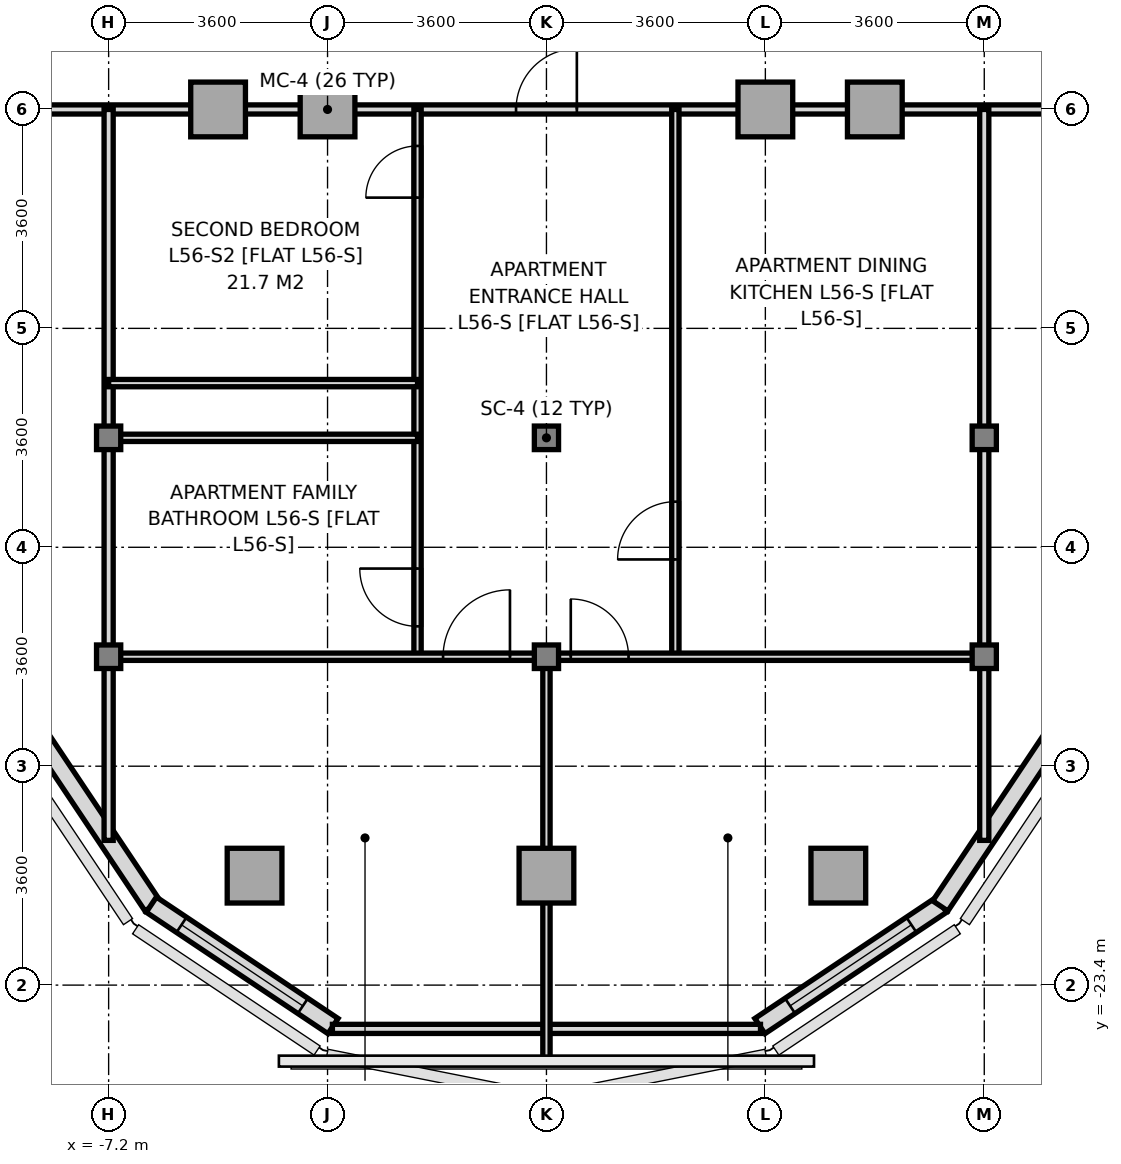
"""IFC4 building model, lengths in metres.
Left out: names, types, materials, properties, quantities, classifications, styles, units other than length and angle.
Written with IfcOpenShell. Run it as: python <this file> out.ifc"""

import sys

from ifc_helpers import new_model, si_unit, direction, frame, frame_2d, origin, origin_2d, place, context, subcontext, project, spatial, rectangle, i_section, extrude, source, transform, mapped, element, fill, save


model = new_model("IFC4")
c1 = context("Model", 3, precision=1e-05, world=origin(), true_north=direction((0.0, 1.0)))
c2 = subcontext(c1, "Body", "Model", "MODEL_VIEW")
j1 = project(units=[si_unit("LENGTHUNIT", "METRE"), si_unit("PLANEANGLEUNIT", "RADIAN")], contexts=[c1])
p1 = place(None, origin())
s1 = spatial("IfcSite", under=j1, at=p1, CompositionType="ELEMENT")
p2 = place(p1, origin())
s2 = spatial("IfcBuilding", under=s1, at=p2, CompositionType="ELEMENT")
p3 = place(p2, frame((0.0, 0.0, 204.6)))
s3 = spatial("IfcBuildingStorey", under=s2, at=p3, CompositionType="ELEMENT", Elevation=204.6)
m1 = source(origin(), c2, "Body", "SweptSolid", [
    extrude(i_section(OverallWidth=0.398, OverallDepth=0.387, WebThickness=0.018, FlangeThickness=0.028, at=origin_2d()), origin(), (0.0, 0.0, 1.0), 3.2),
])
for number, where, z_axis, x_axis in (
    (1, (-7.2, -18.0, 0.0), (0.0, 0.0, 1.0), (1.0, 0.0, 0.0)),
    (2, (-7.2, -14.4, 0.0), (0.0, 0.0, 1.0), (1.0, 0.0, 0.0)),
):
    element("IfcColumn", number, at=place(p3, frame(where, z_axis=z_axis, x_axis=x_axis)), inside=s3, PredefinedType="COLUMN", context=c2, shape_type="MappedRepresentation", body=[
        mapped(m1, transform((0.0, 0.0, 0.0), x_axis=(1.0, 0.0, 0.0), y_axis=(0.0, 1.0, 0.0), z_axis=(0.0, 0.0, 1.0), scale=1.0)),
    ])
m2 = source(origin(), c2, "Body", "SweptSolid", [
    extrude(rectangle(XDim=0.9, YDim=0.9, at=origin_2d()), origin(), (0.0, 0.0, 1.0), 3.2),
])
for number, where, z_axis, x_axis in (
    (3, (-5.4, -9.0, 0.0), (0.0, 0.0, 1.0), (1.0, 0.0, 0.0)),
    (4, (-4.8, -21.6, 0.0), (0.0, 0.0, 1.0), (1.0, 0.0, 0.0)),
    (5, (-3.6, -9.0, 0.0), (0.0, 0.0, 1.0), (1.0, 0.0, 0.0)),
    (6, (0.0, -21.6, 0.0), (0.0, 0.0, 1.0), (1.0, 0.0, 0.0)),
):
    element("IfcColumn", number, at=place(p3, frame(where, z_axis=z_axis, x_axis=x_axis)), inside=s3, PredefinedType="COLUMN", context=c2, shape_type="MappedRepresentation", body=[
        mapped(m2, transform((0.0, 0.0, 0.0), x_axis=(1.0, 0.0, 0.0), y_axis=(0.0, 1.0, 0.0), z_axis=(0.0, 0.0, 1.0), scale=1.0)),
    ])
for number, where, z_axis, x_axis in (
    (7, (0.0, -18.0, 0.0), (0.0, 0.0, 1.0), (1.0, 0.0, 0.0)),
    (8, (0.0, -14.4, 0.0), (0.0, 0.0, 1.0), (1.0, 0.0, 0.0)),
):
    element("IfcColumn", number, at=place(p3, frame(where, z_axis=z_axis, x_axis=x_axis)), inside=s3, PredefinedType="COLUMN", context=c2, shape_type="MappedRepresentation", body=[
        mapped(m1, transform((0.0, 0.0, 0.0), x_axis=(1.0, 0.0, 0.0), y_axis=(0.0, 1.0, 0.0), z_axis=(0.0, 0.0, 1.0), scale=1.0)),
    ])
for number, where, z_axis, x_axis in (
    (9, (3.6, -9.0, 0.0), (0.0, 0.0, 1.0), (1.0, 0.0, 0.0)),
    (10, (4.8, -21.6, 0.0), (0.0, 0.0, 1.0), (1.0, 0.0, 0.0)),
    (11, (5.4, -9.0, 0.0), (0.0, 0.0, 1.0), (1.0, 0.0, 0.0)),
):
    element("IfcColumn", number, at=place(p3, frame(where, z_axis=z_axis, x_axis=x_axis)), inside=s3, PredefinedType="COLUMN", context=c2, shape_type="MappedRepresentation", body=[
        mapped(m2, transform((0.0, 0.0, 0.0), x_axis=(1.0, 0.0, 0.0), y_axis=(0.0, 1.0, 0.0), z_axis=(0.0, 0.0, 1.0), scale=1.0)),
    ])
for number, where, z_axis, x_axis in (
    (12, (7.2, -18.0, 0.0), (0.0, 0.0, 1.0), (1.0, 0.0, 0.0)),
    (13, (7.2, -14.4, 0.0), (0.0, 0.0, 1.0), (1.0, 0.0, 0.0)),
):
    element("IfcColumn", number, at=place(p3, frame(where, z_axis=z_axis, x_axis=x_axis)), inside=s3, PredefinedType="COLUMN", context=c2, shape_type="MappedRepresentation", body=[
        mapped(m1, transform((0.0, 0.0, 0.0), x_axis=(1.0, 0.0, 0.0), y_axis=(0.0, 1.0, 0.0), z_axis=(0.0, 0.0, 1.0), scale=1.0)),
    ])
p4 = place(p3, frame((-8.482, -19.097, 0.0), z_axis=(0.0, 0.0, 1.0), x_axis=(0.555574187116, -0.831466970246, 0.0)))
e14 = element("IfcWall", 14, at=p4, inside=s3, PredefinedType="SOLIDWALL", context=c2, shape_type="SweptSolid", body=[
    extrude(rectangle(XDim=3.609, YDim=0.3, at=frame_2d((1.804, 0.0))), origin(), (0.0, 0.0, 1.0), 3.2),
])
p5 = place(p3, frame((-6.498, -22.077, 0.0), z_axis=(0.0, 0.0, 1.0), x_axis=(0.8314749531, -0.555562239868, 0.0)))
e15 = element("IfcWall", 15, at=p5, inside=s3, PredefinedType="SOLIDWALL", context=c2, shape_type="SweptSolid", body=[
    extrude(rectangle(XDim=3.593, YDim=0.3, at=frame_2d((1.797, 0.0))), origin(), (0.0, 0.0, 1.0), 3.2),
])
p6 = place(p5, frame((0.597, 0.0, 0.8)))
e16 = element("IfcOpeningElement", 16, at=p6, cuts=e15, PredefinedType="OPENING", context=c2, shape_type="SweptSolid", body=[
    extrude(rectangle(XDim=2.4, YDim=2.2, at=frame_2d((1.2, 1.1))), frame((0.0, 0.16, 0.0), z_axis=(0.0, -1.0, 0.0), x_axis=(1.0, 0.0, 0.0)), (0.0, 0.0, 1.0), 0.32),
])
p7 = place(p3, frame((3.51, -24.073, 0.0), z_axis=(0.0, 0.0, 1.0), x_axis=(0.8314749531, 0.555562239868, 0.0)))
e17 = element("IfcWall", 17, at=p7, inside=s3, PredefinedType="SOLIDWALL", context=c2, shape_type="SweptSolid", body=[
    extrude(rectangle(XDim=3.593, YDim=0.3, at=frame_2d((1.797, 0.0))), origin(), (0.0, 0.0, 1.0), 3.2),
])
p8 = place(p7, frame((0.597, 0.0, 0.8)))
e18 = element("IfcOpeningElement", 18, at=p8, cuts=e17, PredefinedType="OPENING", context=c2, shape_type="SweptSolid", body=[
    extrude(rectangle(XDim=2.4, YDim=2.2, at=frame_2d((1.2, 1.1))), frame((0.0, 0.16, 0.0), z_axis=(0.0, -1.0, 0.0), x_axis=(1.0, 0.0, 0.0)), (0.0, 0.0, 1.0), 0.32),
])
p9 = place(p3, frame((6.477, -22.098, 0.0), z_axis=(0.0, 0.0, 1.0), x_axis=(0.555574187116, 0.831466970246, 0.0)))
e19 = element("IfcWall", 19, at=p9, inside=s3, PredefinedType="SOLIDWALL", context=c2, shape_type="SweptSolid", body=[
    extrude(rectangle(XDim=3.609, YDim=0.3, at=frame_2d((1.804, 0.0))), origin(), (0.0, 0.0, 1.0), 3.2),
])
p10 = place(p3, frame((-9.55, -9.0, 0.0), z_axis=(0.0, 0.0, 1.0), x_axis=(1.0, 0.0, 0.0)))
e20 = element("IfcWall", 20, at=p10, inside=s3, PredefinedType="PARTITIONING", context=c2, shape_type="SweptSolid", body=[
    extrude(rectangle(XDim=19.1, YDim=0.15, at=frame_2d((9.55, 0.0))), origin(), (0.0, 0.0, 1.0), 2.75),
])
p11 = place(p10, frame((9.05, 0.0, 0.0)))
e21 = element("IfcOpeningElement", 21, at=p11, cuts=e20, PredefinedType="OPENING", context=c2, shape_type="SweptSolid", body=[
    extrude(rectangle(XDim=1.0, YDim=2.2, at=frame_2d((0.5, 1.1))), frame((0.0, 0.085, 0.0), z_axis=(0.0, -1.0, 0.0), x_axis=(1.0, 0.0, 0.0)), (0.0, 0.0, 1.0), 0.17),
])
for number, where, z_axis, x_axis in (
    (22, (-7.2, -21.02, 0.0), (0.0, 0.0, 1.0), (0.0, 1.0, 0.0)),
    (23, (7.2, -21.02, 0.0), (0.0, 0.0, 1.0), (0.0, 1.0, 0.0)),
):
    element("IfcWall", number, at=place(p3, frame(where, z_axis=z_axis, x_axis=x_axis)), inside=s3, PredefinedType="PARTITIONING", context=c2, shape_type="SweptSolid", body=[
        extrude(rectangle(XDim=12.02, YDim=0.15, at=frame_2d((6.01, 0.0))), origin(), (0.0, 0.0, 1.0), 2.75),
    ])
p12 = place(p3, frame((-3.52, -24.12, 0.0), z_axis=(0.0, 0.0, 1.0), x_axis=(1.0, 0.0, 0.0)))
e24 = element("IfcWall", 24, at=p12, inside=s3, PredefinedType="PARTITIONING", context=c2, shape_type="SweptSolid", body=[
    extrude(rectangle(XDim=7.04, YDim=0.15, at=frame_2d((3.52, 0.0))), origin(), (0.0, 0.0, 1.0), 3.2),
])
p13 = place(p3, frame((-2.12, -18.0, 0.0), z_axis=(0.0, 0.0, 1.0), x_axis=(0.0, 1.0, 0.0)))
e25 = element("IfcWall", 25, at=p13, inside=s3, PredefinedType="PARTITIONING", context=c2, shape_type="SweptSolid", body=[
    extrude(rectangle(XDim=9.0, YDim=0.12, at=frame_2d((4.5, 0.0))), origin(), (0.0, 0.0, 1.0), 2.75),
])
p14 = place(p13, frame((7.55, 0.0, 0.0)))
e26 = element("IfcOpeningElement", 26, at=p14, cuts=e25, PredefinedType="OPENING", context=c2, shape_type="SweptSolid", body=[
    extrude(rectangle(XDim=0.85, YDim=2.1, at=frame_2d((0.425, 1.05))), frame((0.0, 0.07, 0.0), z_axis=(0.0, -1.0, 0.0), x_axis=(1.0, 0.0, 0.0)), (0.0, 0.0, 1.0), 0.14),
])
p15 = place(p13, frame((0.5, 0.0, 0.0)))
e27 = element("IfcOpeningElement", 27, at=p15, cuts=e25, PredefinedType="OPENING", context=c2, shape_type="SweptSolid", body=[
    extrude(rectangle(XDim=0.95, YDim=2.15, at=frame_2d((0.475, 1.075))), frame((0.0, 0.07, 0.0), z_axis=(0.0, -1.0, 0.0), x_axis=(1.0, 0.0, 0.0)), (0.0, 0.0, 1.0), 0.14),
])
p16 = place(p3, frame((-7.2, -13.5, 0.0), z_axis=(0.0, 0.0, 1.0), x_axis=(1.0, 0.0, 0.0)))
e28 = element("IfcWall", 28, at=p16, inside=s3, PredefinedType="PARTITIONING", context=c2, shape_type="SweptSolid", body=[
    extrude(rectangle(XDim=5.08, YDim=0.12, at=frame_2d((2.54, 0.0))), origin(), (0.0, 0.0, 1.0), 3.2),
])
p17 = place(p3, frame((2.12, -18.0, 0.0), z_axis=(0.0, 0.0, 1.0), x_axis=(0.0, 1.0, 0.0)))
e29 = element("IfcWall", 29, at=p17, inside=s3, PredefinedType="PARTITIONING", context=c2, shape_type="SweptSolid", body=[
    extrude(rectangle(XDim=9.0, YDim=0.12, at=frame_2d((4.5, 0.0))), origin(), (0.0, 0.0, 1.0), 2.75),
])
p18 = place(p17, frame((1.6, 0.0, 0.0)))
e30 = element("IfcOpeningElement", 30, at=p18, cuts=e29, PredefinedType="OPENING", context=c2, shape_type="SweptSolid", body=[
    extrude(rectangle(XDim=0.95, YDim=2.15, at=frame_2d((0.475, 1.075))), frame((0.0, 0.07, 0.0), z_axis=(0.0, -1.0, 0.0), x_axis=(1.0, 0.0, 0.0)), (0.0, 0.0, 1.0), 0.14),
])
p19 = place(p3, frame((-7.2, -18.0, 0.0), z_axis=(0.0, 0.0, 1.0), x_axis=(1.0, 0.0, 0.0)))
e31 = element("IfcWall", 31, at=p19, inside=s3, PredefinedType="PARTITIONING", context=c2, shape_type="SweptSolid", body=[
    extrude(rectangle(XDim=14.4, YDim=0.12, at=frame_2d((7.2, 0.0))), origin(), (0.0, 0.0, 1.0), 2.75),
])
p20 = place(p19, frame((5.5, 0.0, 0.0)))
e32 = element("IfcOpeningElement", 32, at=p20, cuts=e31, PredefinedType="OPENING", context=c2, shape_type="SweptSolid", body=[
    extrude(rectangle(XDim=1.1, YDim=2.2, at=frame_2d((0.55, 1.1))), frame((0.0, 0.07, 0.0), z_axis=(0.0, -1.0, 0.0), x_axis=(1.0, 0.0, 0.0)), (0.0, 0.0, 1.0), 0.14),
])
p21 = place(p19, frame((7.6, 0.0, 0.0)))
e33 = element("IfcOpeningElement", 33, at=p21, cuts=e31, PredefinedType="OPENING", context=c2, shape_type="SweptSolid", body=[
    extrude(rectangle(XDim=0.95, YDim=2.15, at=frame_2d((0.475, 1.075))), frame((0.0, 0.07, 0.0), z_axis=(0.0, -1.0, 0.0), x_axis=(1.0, 0.0, 0.0)), (0.0, 0.0, 1.0), 0.14),
])
p22 = place(p3, frame((0.0, -24.65, 0.0), z_axis=(0.0, 0.0, 1.0), x_axis=(0.0, 1.0, 0.0)))
e34 = element("IfcWall", 34, at=p22, inside=s3, PredefinedType="PARTITIONING", context=c2, shape_type="SweptSolid", body=[
    extrude(rectangle(XDim=6.65, YDim=0.12, at=frame_2d((3.325, 0.0))), origin(), (0.0, 0.0, 1.0), 2.75),
])
p23 = place(p3, frame((-7.2, -14.4, 0.0), z_axis=(0.0, 0.0, 1.0), x_axis=(1.0, 0.0, 0.0)))
e35 = element("IfcWall", 35, at=p23, inside=s3, PredefinedType="PARTITIONING", context=c2, shape_type="SweptSolid", body=[
    extrude(rectangle(XDim=5.08, YDim=0.12, at=frame_2d((2.54, 0.0))), origin(), (0.0, 0.0, 1.0), 2.75),
])
m3 = source(origin(), c2, "Body", "SweptSolid", [
    extrude(rectangle(XDim=2.4, YDim=2.2, at=frame_2d((1.2, 1.1))), frame((0.0, 0.03, 0.0), z_axis=(0.0, -1.0, 0.0), x_axis=(1.0, 0.0, 0.0)), (0.0, 0.0, 1.0), 0.06),
])
p24 = place(p6, origin())
e36 = element("IfcWindow", 36, at=p24, inside=s3, PartitioningType="SINGLE_PANEL", PredefinedType="WINDOW", context=c2, shape_type="MappedRepresentation", body=[
    mapped(m3, transform((0.0, 0.0, 0.0), x_axis=(1.0, 0.0, 0.0), y_axis=(0.0, 1.0, 0.0), z_axis=(0.0, 0.0, 1.0), scale=1.0)),
])
fill(e16, e36)
p25 = place(p8, origin())
e37 = element("IfcWindow", 37, at=p25, inside=s3, PartitioningType="SINGLE_PANEL", PredefinedType="WINDOW", context=c2, shape_type="MappedRepresentation", body=[
    mapped(m3, transform((0.0, 0.0, 0.0), x_axis=(1.0, 0.0, 0.0), y_axis=(0.0, 1.0, 0.0), z_axis=(0.0, 0.0, 1.0), scale=1.0)),
])
fill(e18, e37)
m4 = source(origin(), c2, "Body", "SweptSolid", [
    extrude(rectangle(XDim=1.0, YDim=2.2, at=frame_2d((0.5, 1.1))), frame((0.0, 0.025, 0.0), z_axis=(0.0, -1.0, 0.0), x_axis=(1.0, 0.0, 0.0)), (0.0, 0.0, 1.0), 0.05),
])
p26 = place(p11, origin())
e38 = element("IfcDoor", 38, at=p26, inside=s3, OperationType="SINGLE_SWING_RIGHT", PredefinedType="DOOR", context=c2, shape_type="MappedRepresentation", body=[
    mapped(m4, transform((0.0, 0.0, 0.0), x_axis=(1.0, 0.0, 0.0), y_axis=(0.0, 1.0, 0.0), z_axis=(0.0, 0.0, 1.0), scale=1.0)),
])
fill(e21, e38)
m5 = source(origin(), c2, "Body", "SweptSolid", [
    extrude(rectangle(XDim=0.85, YDim=2.1, at=frame_2d((0.425, 1.05))), frame((0.0, 0.025, 0.0), z_axis=(0.0, -1.0, 0.0), x_axis=(1.0, 0.0, 0.0)), (0.0, 0.0, 1.0), 0.05),
])
p27 = place(p14, origin())
e39 = element("IfcDoor", 39, at=p27, inside=s3, OperationType="SINGLE_SWING_LEFT", PredefinedType="DOOR", context=c2, shape_type="MappedRepresentation", body=[
    mapped(m5, transform((0.0, 0.0, 0.0), x_axis=(1.0, 0.0, 0.0), y_axis=(0.0, 1.0, 0.0), z_axis=(0.0, 0.0, 1.0), scale=1.0)),
])
fill(e26, e39)
m6 = source(origin(), c2, "Body", "SweptSolid", [
    extrude(rectangle(XDim=0.95, YDim=2.15, at=frame_2d((0.475, 1.075))), frame((0.0, 0.025, 0.0), z_axis=(0.0, -1.0, 0.0), x_axis=(1.0, 0.0, 0.0)), (0.0, 0.0, 1.0), 0.05),
])
p28 = place(p15, origin())
e40 = element("IfcDoor", 40, at=p28, inside=s3, OperationType="SINGLE_SWING_RIGHT", PredefinedType="DOOR", context=c2, shape_type="MappedRepresentation", body=[
    mapped(m6, transform((0.0, 0.0, 0.0), x_axis=(1.0, 0.0, 0.0), y_axis=(0.0, 1.0, 0.0), z_axis=(0.0, 0.0, 1.0), scale=1.0)),
])
fill(e27, e40)
p29 = place(p18, origin())
e41 = element("IfcDoor", 41, at=p29, inside=s3, OperationType="SINGLE_SWING_LEFT", PredefinedType="DOOR", context=c2, shape_type="MappedRepresentation", body=[
    mapped(m6, transform((0.0, 0.0, 0.0), x_axis=(1.0, 0.0, 0.0), y_axis=(0.0, 1.0, 0.0), z_axis=(0.0, 0.0, 1.0), scale=1.0)),
])
fill(e30, e41)
m7 = source(origin(), c2, "Body", "SweptSolid", [
    extrude(rectangle(XDim=1.1, YDim=2.2, at=frame_2d((0.55, 1.1))), frame((0.0, 0.025, 0.0), z_axis=(0.0, -1.0, 0.0), x_axis=(1.0, 0.0, 0.0)), (0.0, 0.0, 1.0), 0.05),
])
p30 = place(p20, origin())
e42 = element("IfcDoor", 42, at=p30, inside=s3, OperationType="SINGLE_SWING_RIGHT", PredefinedType="DOOR", context=c2, shape_type="MappedRepresentation", body=[
    mapped(m7, transform((0.0, 0.0, 0.0), x_axis=(1.0, 0.0, 0.0), y_axis=(0.0, 1.0, 0.0), z_axis=(0.0, 0.0, 1.0), scale=1.0)),
])
fill(e32, e42)
p31 = place(p21, origin())
e43 = element("IfcDoor", 43, at=p31, inside=s3, OperationType="SINGLE_SWING_LEFT", PredefinedType="DOOR", context=c2, shape_type="MappedRepresentation", body=[
    mapped(m6, transform((0.0, 0.0, 0.0), x_axis=(1.0, 0.0, 0.0), y_axis=(0.0, 1.0, 0.0), z_axis=(0.0, 0.0, 1.0), scale=1.0)),
])
fill(e33, e43)
save(model, sys.argv[1])
